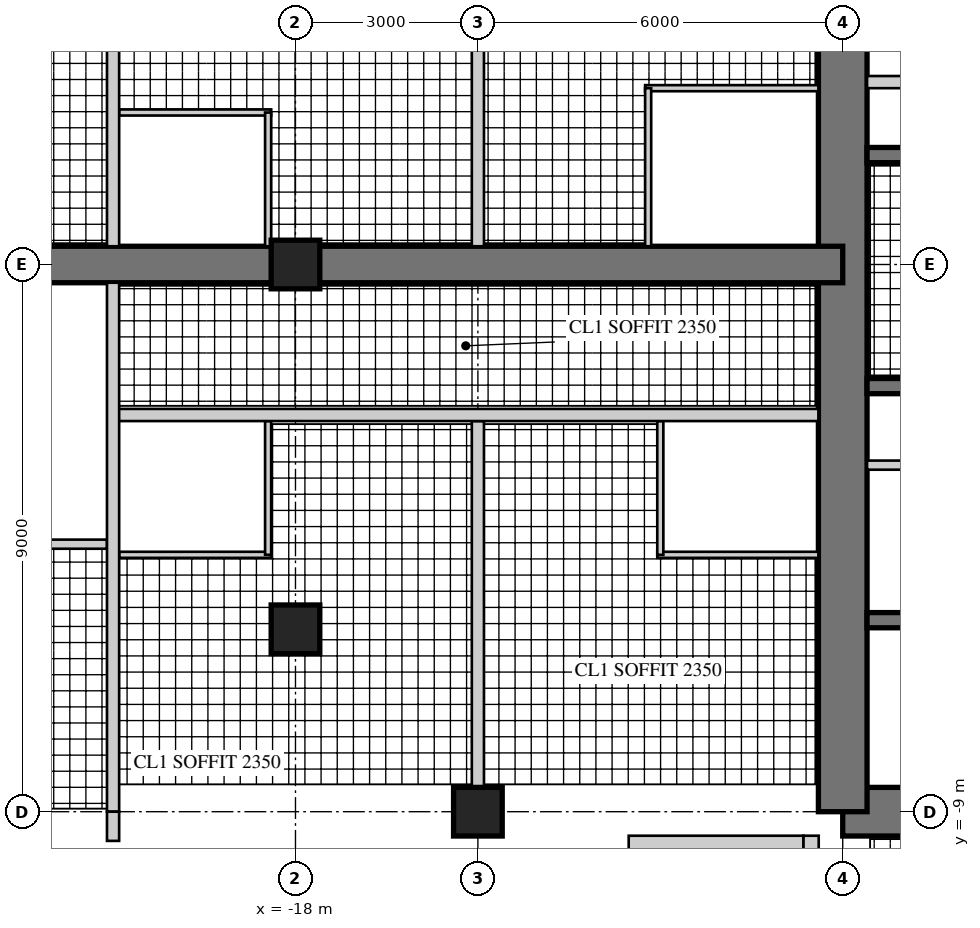
"""IFC4 building model, lengths in metres.
Left out: names, types, materials, properties, quantities, classifications, styles, units other than length and angle.
Written with IfcOpenShell. Run it as: python <this file> out.ifc"""

import sys

from ifc_helpers import new_model, si_unit, direction, frame, frame_2d, origin, origin_2d, place, context, subcontext, project, spatial, rectangle, hollow_rectangle, extrude, element, fill, save


model = new_model("IFC4")
c1 = context("Model", 3, precision=1e-05, world=origin(), true_north=direction((0.0, 1.0)))
c2 = subcontext(c1, "Body", "Model", "MODEL_VIEW")
j1 = project(units=[si_unit("LENGTHUNIT", "METRE"), si_unit("PLANEANGLEUNIT", "RADIAN")], contexts=[c1])
p1 = place(None, origin())
s1 = spatial("IfcSite", under=j1, at=p1, CompositionType="ELEMENT")
p2 = place(p1, origin())
s2 = spatial("IfcBuilding", under=s1, at=p2, CompositionType="ELEMENT")
p3 = place(p2, frame((0.0, 0.0, 225.5)))
s3 = spatial("IfcBuildingStorey", under=s2, at=p3, CompositionType="ELEMENT", Elevation=225.5)
p4 = place(p3, frame((-9.0, -9.0, 0.0), z_axis=(0.0, 0.0, 1.0), x_axis=(1.0, 0.0, 0.0)))
e1 = element("IfcWall", 1, at=p4, inside=s3, PredefinedType="SHEAR", context=c2, shape_type="SweptSolid", body=[
    extrude(rectangle(XDim=18.0, YDim=0.8, at=frame_2d((9.0, 0.0))), origin(), (0.0, 0.0, 1.0), 3.4),
])
p5 = place(p4, frame((9.8, 0.0, 0.0)))
e2 = element("IfcOpeningElement", 2, at=p5, cuts=e1, PredefinedType="OPENING", context=c2, shape_type="SweptSolid", body=[
    extrude(rectangle(XDim=1.0, YDim=2.4, at=frame_2d((0.5, 1.2))), frame((0.0, 0.41, 0.0), z_axis=(0.0, -1.0, 0.0), x_axis=(1.0, 0.0, 0.0)), (0.0, 0.0, 1.0), 0.82),
])
p6 = place(p3, frame((-9.0, 9.0, 0.0), z_axis=(0.0, 0.0, 1.0), x_axis=(0.0, -1.0, 0.0)))
e3 = element("IfcWall", 3, at=p6, inside=s3, PredefinedType="SHEAR", context=c2, shape_type="SweptSolid", body=[
    extrude(rectangle(XDim=18.0, YDim=0.8, at=frame_2d((9.0, 0.0))), origin(), (0.0, 0.0, 1.0), 3.4),
])
p7 = place(p6, frame((9.8, 0.0, 0.0)))
e4 = element("IfcOpeningElement", 4, at=p7, cuts=e3, PredefinedType="OPENING", context=c2, shape_type="SweptSolid", body=[
    extrude(rectangle(XDim=1.0, YDim=2.4, at=frame_2d((0.5, 1.2))), frame((0.0, 0.41, 0.0), z_axis=(0.0, -1.0, 0.0), x_axis=(1.0, 0.0, 0.0)), (0.0, 0.0, 1.0), 0.82),
])
p8 = place(p3, frame((-2.125, 1.8, 0.0), z_axis=(0.0, 0.0, 1.0), x_axis=(-1.0, 0.0, 0.0)))
e5 = element("IfcWall", 5, at=p8, inside=s3, PredefinedType="SHEAR", context=c2, shape_type="SweptSolid", body=[
    extrude(rectangle(XDim=6.475, YDim=0.25, at=frame_2d((3.238, 0.0))), origin(), (0.0, 0.0, 1.0), 3.4),
])
p9 = place(p3, frame((-5.725, 3.0, 0.0), z_axis=(0.0, 0.0, 1.0), x_axis=(-1.0, 0.0, 0.0)))
e6 = element("IfcWall", 6, at=p9, inside=s3, PredefinedType="PARTITIONING", context=c2, shape_type="SweptSolid", body=[
    extrude(rectangle(XDim=2.875, YDim=0.2, at=frame_2d((1.438, 0.0))), origin(), (0.0, 0.0, 1.0), 3.4),
])
p10 = place(p3, frame((-1.925, -2.0, 0.0), z_axis=(0.0, 0.0, 1.0), x_axis=(-1.0, 0.0, 0.0)))
e7 = element("IfcWall", 7, at=p10, inside=s3, PredefinedType="SHEAR", context=c2, shape_type="SweptSolid", body=[
    extrude(rectangle(XDim=6.675, YDim=0.25, at=frame_2d((3.337, 0.0))), origin(), (0.0, 0.0, 1.0), 3.4),
])
p11 = place(p3, frame((-1.925, -5.85, 0.0), z_axis=(0.0, 0.0, 1.0), x_axis=(-1.0, 0.0, 0.0)))
e8 = element("IfcWall", 8, at=p11, inside=s3, PredefinedType="SHEAR", context=c2, shape_type="SweptSolid", body=[
    extrude(rectangle(XDim=6.675, YDim=0.25, at=frame_2d((3.337, 0.0))), origin(), (0.0, 0.0, 1.0), 3.4),
])
p12 = place(p11, frame((0.496, 0.0, 0.0)))
e9 = element("IfcOpeningElement", 9, at=p12, cuts=e8, PredefinedType="OPENING", context=c2, shape_type="SweptSolid", body=[
    extrude(rectangle(XDim=1.1, YDim=2.2, at=frame_2d((0.55, 1.1))), frame((0.0, 0.135, 0.0), z_axis=(0.0, -1.0, 0.0), x_axis=(1.0, 0.0, 0.0)), (0.0, 0.0, 1.0), 0.27),
])
p13 = place(p11, frame((2.788, 0.0, 0.0)))
e10 = element("IfcOpeningElement", 10, at=p13, cuts=e8, PredefinedType="OPENING", context=c2, shape_type="SweptSolid", body=[
    extrude(rectangle(XDim=1.1, YDim=2.2, at=frame_2d((0.55, 1.1))), frame((0.0, 0.135, 0.0), z_axis=(0.0, -1.0, 0.0), x_axis=(1.0, 0.0, 0.0)), (0.0, 0.0, 1.0), 0.27),
])
p14 = place(p11, frame((5.079, 0.0, 0.0)))
e11 = element("IfcOpeningElement", 11, at=p14, cuts=e8, PredefinedType="OPENING", context=c2, shape_type="SweptSolid", body=[
    extrude(rectangle(XDim=1.1, YDim=2.2, at=frame_2d((0.55, 1.1))), frame((0.0, 0.135, 0.0), z_axis=(0.0, -1.0, 0.0), x_axis=(1.0, 0.0, 0.0)), (0.0, 0.0, 1.0), 0.27),
])
p15 = place(p3, frame((-1.925, -3.3, 0.0), z_axis=(0.0, 0.0, 1.0), x_axis=(-1.0, 0.0, 0.0)))
e12 = element("IfcWall", 12, at=p15, inside=s3, PredefinedType="PARTITIONING", context=c2, shape_type="SweptSolid", body=[
    extrude(rectangle(XDim=6.675, YDim=0.15, at=frame_2d((3.337, 0.0))), origin(), (0.0, 0.0, 1.0), 3.4),
])
p16 = place(p15, frame((0.075, 0.0, 0.0)))
e13 = element("IfcOpeningElement", 13, at=p16, cuts=e12, PredefinedType="OPENING", context=c2, shape_type="SweptSolid", body=[
    extrude(rectangle(XDim=0.8, YDim=2.1, at=frame_2d((0.4, 1.05))), frame((0.0, 0.085, 0.0), z_axis=(0.0, -1.0, 0.0), x_axis=(1.0, 0.0, 0.0)), (0.0, 0.0, 1.0), 0.17),
])
p17 = place(p15, frame((3.675, 0.0, 0.0)))
e14 = element("IfcOpeningElement", 14, at=p17, cuts=e12, PredefinedType="OPENING", context=c2, shape_type="SweptSolid", body=[
    extrude(rectangle(XDim=0.8, YDim=2.1, at=frame_2d((0.4, 1.05))), frame((0.0, 0.085, 0.0), z_axis=(0.0, -1.0, 0.0), x_axis=(1.0, 0.0, 0.0)), (0.0, 0.0, 1.0), 0.17),
])
p18 = place(p3, frame((-9.0, 0.0, 0.0), z_axis=(0.0, 0.0, 1.0), x_axis=(-1.0, 0.0, 0.0)))
e15 = element("IfcWall", 15, at=p18, inside=s3, PredefinedType="SHEAR", context=c2, shape_type="SweptSolid", body=[
    extrude(rectangle(XDim=18.0, YDim=0.6, at=frame_2d((9.0, 0.0))), origin(), (0.0, 0.0, 1.0), 3.4),
])
p19 = place(p18, frame((3.8, 0.0, 0.0)))
e16 = element("IfcOpeningElement", 16, at=p19, cuts=e15, PredefinedType="OPENING", context=c2, shape_type="SweptSolid", body=[
    extrude(rectangle(XDim=1.0, YDim=2.15, at=frame_2d((0.5, 1.075))), frame((0.0, 0.31, 0.0), z_axis=(0.0, -1.0, 0.0), x_axis=(1.0, 0.0, 0.0)), (0.0, 0.0, 1.0), 0.62),
])
p20 = place(p18, frame((6.6, 0.0, 0.0)))
e17 = element("IfcOpeningElement", 17, at=p20, cuts=e15, PredefinedType="OPENING", context=c2, shape_type="SweptSolid", body=[
    extrude(rectangle(XDim=1.0, YDim=2.15, at=frame_2d((0.5, 1.075))), frame((0.0, 0.31, 0.0), z_axis=(0.0, -1.0, 0.0), x_axis=(1.0, 0.0, 0.0)), (0.0, 0.0, 1.0), 0.62),
])
p21 = place(p18, frame((13.3, 0.0, 0.0)))
e18 = element("IfcOpeningElement", 18, at=p21, cuts=e15, PredefinedType="OPENING", context=c2, shape_type="SweptSolid", body=[
    extrude(rectangle(XDim=1.0, YDim=2.2, at=frame_2d((0.5, 1.1))), frame((0.0, 0.31, 0.0), z_axis=(0.0, -1.0, 0.0), x_axis=(1.0, 0.0, 0.0)), (0.0, 0.0, 1.0), 0.62),
])
for number, where, z_axis, x_axis in (
    (19, (-15.0, -9.0, 0.0), (0.0, 0.0, 1.0), (1.0, 0.0, 0.0)),
    (20, (-18.0, 0.0, 0.0), (0.0, 0.0, 1.0), (1.0, 0.0, 0.0)),
    (21, (-18.0, -6.0, 0.0), (0.0, 0.0, 1.0), (1.0, 0.0, 0.0)),
):
    element("IfcColumn", number, at=place(p3, frame(where, z_axis=z_axis, x_axis=x_axis)), inside=s3, PredefinedType="COLUMN", context=c2, shape_type="SweptSolid", body=[
        extrude(rectangle(XDim=0.8, YDim=0.8, at=origin_2d()), origin(), (0.0, 0.0, 1.0), 3.4),
    ])
p22 = place(p3, frame((-12.52, -9.52, 0.0), z_axis=(0.0, 0.0, 1.0), x_axis=(1.0, 0.0, 0.0)))
e22 = element("IfcWall", 22, at=p22, inside=s3, PredefinedType="SOLIDWALL", context=c2, shape_type="SweptSolid", body=[
    extrude(rectangle(XDim=2.875, YDim=0.25, at=frame_2d((1.438, 0.0))), origin(), (0.0, 0.0, 1.0), 3.22),
])
p23 = place(p22, frame((0.6, 0.0, 0.0)))
e23 = element("IfcOpeningElement", 23, at=p23, cuts=e22, PredefinedType="OPENING", context=c2, shape_type="SweptSolid", body=[
    extrude(rectangle(XDim=1.0, YDim=2.2, at=frame_2d((0.5, 1.1))), frame((0.0, 0.135, 0.0), z_axis=(0.0, -1.0, 0.0), x_axis=(1.0, 0.0, 0.0)), (0.0, 0.0, 1.0), 0.27),
])
p24 = place(p3, frame((-9.52, -9.395, 0.0), z_axis=(0.0, 0.0, 1.0), x_axis=(0.0, -1.0, 0.0)))
e24 = element("IfcWall", 24, at=p24, inside=s3, PredefinedType="SOLIDWALL", context=c2, shape_type="SweptSolid", body=[
    extrude(rectangle(XDim=3.125, YDim=0.25, at=frame_2d((1.562, 0.0))), origin(), (0.0, 0.0, 1.0), 3.22),
])
p25 = place(p24, frame((0.6, 0.0, 0.0)))
e25 = element("IfcOpeningElement", 25, at=p25, cuts=e24, PredefinedType="OPENING", context=c2, shape_type="SweptSolid", body=[
    extrude(rectangle(XDim=1.0, YDim=2.2, at=frame_2d((0.5, 1.1))), frame((0.0, 0.135, 0.0), z_axis=(0.0, -1.0, 0.0), x_axis=(1.0, 0.0, 0.0)), (0.0, 0.0, 1.0), 0.27),
])
p26 = place(p3, frame((-9.4, -4.775, 0.0), z_axis=(0.0, 0.0, 1.0), x_axis=(-1.0, 0.0, 0.0)))
e26 = element("IfcWall", 26, at=p26, inside=s3, PredefinedType="PARTITIONING", context=c2, shape_type="SweptSolid", body=[
    extrude(rectangle(XDim=2.65, YDim=0.1, at=frame_2d((1.325, 0.0))), origin(), (0.0, 0.0, 1.0), 3.22),
])
p27 = place(p3, frame((-12.0, -2.575, 0.0), z_axis=(0.0, 0.0, 1.0), x_axis=(0.0, -1.0, 0.0)))
e27 = element("IfcWall", 27, at=p27, inside=s3, PredefinedType="PARTITIONING", context=c2, shape_type="SweptSolid", body=[
    extrude(rectangle(XDim=2.2, YDim=0.1, at=frame_2d((1.1, 0.0))), origin(), (0.0, 0.0, 1.0), 3.22),
])
p28 = place(p27, frame((0.55, 0.0, 0.0)))
e28 = element("IfcOpeningElement", 28, at=p28, cuts=e27, PredefinedType="OPENING", context=c2, shape_type="SweptSolid", body=[
    extrude(rectangle(XDim=0.9, YDim=2.1, at=frame_2d((0.45, 1.05))), frame((0.0, 0.06, 0.0), z_axis=(0.0, -1.0, 0.0), x_axis=(1.0, 0.0, 0.0)), (0.0, 0.0, 1.0), 0.12),
])
p29 = place(p3, frame((-9.4, 2.9, 0.0), z_axis=(0.0, 0.0, 1.0), x_axis=(-1.0, 0.0, 0.0)))
e29 = element("IfcWall", 29, at=p29, inside=s3, PredefinedType="PARTITIONING", context=c2, shape_type="SweptSolid", body=[
    extrude(rectangle(XDim=2.85, YDim=0.1, at=frame_2d((1.425, 0.0))), origin(), (0.0, 0.0, 1.0), 3.22),
])
p30 = place(p3, frame((-12.2, 2.9, 0.0), z_axis=(0.0, 0.0, 1.0), x_axis=(0.0, -1.0, 0.0)))
e30 = element("IfcWall", 30, at=p30, inside=s3, PredefinedType="PARTITIONING", context=c2, shape_type="SweptSolid", body=[
    extrude(rectangle(XDim=2.6, YDim=0.1, at=frame_2d((1.3, 0.0))), origin(), (0.0, 0.0, 1.0), 3.22),
])
p31 = place(p30, frame((0.55, 0.0, 0.0)))
e31 = element("IfcOpeningElement", 31, at=p31, cuts=e30, PredefinedType="OPENING", context=c2, shape_type="SweptSolid", body=[
    extrude(rectangle(XDim=0.9, YDim=2.1, at=frame_2d((0.45, 1.05))), frame((0.0, 0.06, 0.0), z_axis=(0.0, -1.0, 0.0), x_axis=(1.0, 0.0, 0.0)), (0.0, 0.0, 1.0), 0.12),
])
p32 = place(p3, frame((-15.0, -2.575, 0.0), z_axis=(0.0, 0.0, 1.0), x_axis=(0.0, -1.0, 0.0)))
e32 = element("IfcWall", 32, at=p32, inside=s3, PredefinedType="SOLIDWALL", context=c2, shape_type="SweptSolid", body=[
    extrude(rectangle(XDim=6.025, YDim=0.2, at=frame_2d((3.013, 0.0))), origin(), (0.0, 0.0, 1.0), 2.52),
])
p33 = place(p3, frame((-15.0, 8.6, 0.0), z_axis=(0.0, 0.0, 1.0), x_axis=(0.0, -1.0, 0.0)))
e33 = element("IfcWall", 33, at=p33, inside=s3, PredefinedType="SOLIDWALL", context=c2, shape_type="SweptSolid", body=[
    extrude(rectangle(XDim=8.3, YDim=0.2, at=frame_2d((4.15, 0.0))), origin(), (0.0, 0.0, 1.0), 2.52),
])
p34 = place(p3, frame((-18.4, -4.775, 0.0), z_axis=(0.0, 0.0, 1.0), x_axis=(-1.0, 0.0, 0.0)))
e34 = element("IfcWall", 34, at=p34, inside=s3, PredefinedType="PARTITIONING", context=c2, shape_type="SweptSolid", body=[
    extrude(rectangle(XDim=2.5, YDim=0.1, at=frame_2d((1.25, 0.0))), origin(), (0.0, 0.0, 1.0), 3.22),
])
p35 = place(p3, frame((-18.45, -2.575, 0.0), z_axis=(0.0, 0.0, 1.0), x_axis=(0.0, -1.0, 0.0)))
e35 = element("IfcWall", 35, at=p35, inside=s3, PredefinedType="PARTITIONING", context=c2, shape_type="SweptSolid", body=[
    extrude(rectangle(XDim=2.2, YDim=0.1, at=frame_2d((1.1, 0.0))), origin(), (0.0, 0.0, 1.0), 3.22),
])
p36 = place(p35, frame((0.55, 0.0, 0.0)))
e36 = element("IfcOpeningElement", 36, at=p36, cuts=e35, PredefinedType="OPENING", context=c2, shape_type="SweptSolid", body=[
    extrude(rectangle(XDim=0.9, YDim=2.1, at=frame_2d((0.45, 1.05))), frame((0.0, 0.06, 0.0), z_axis=(0.0, -1.0, 0.0), x_axis=(1.0, 0.0, 0.0)), (0.0, 0.0, 1.0), 0.12),
])
p37 = place(p3, frame((-18.4, 2.5, 0.0), z_axis=(0.0, 0.0, 1.0), x_axis=(-1.0, 0.0, 0.0)))
e37 = element("IfcWall", 37, at=p37, inside=s3, PredefinedType="PARTITIONING", context=c2, shape_type="SweptSolid", body=[
    extrude(rectangle(XDim=2.5, YDim=0.1, at=frame_2d((1.25, 0.0))), origin(), (0.0, 0.0, 1.0), 3.22),
])
p38 = place(p3, frame((-18.45, 2.5, 0.0), z_axis=(0.0, 0.0, 1.0), x_axis=(0.0, -1.0, 0.0)))
e38 = element("IfcWall", 38, at=p38, inside=s3, PredefinedType="PARTITIONING", context=c2, shape_type="SweptSolid", body=[
    extrude(rectangle(XDim=2.2, YDim=0.1, at=frame_2d((1.1, 0.0))), origin(), (0.0, 0.0, 1.0), 3.22),
])
p39 = place(p38, frame((0.55, 0.0, 0.0)))
e39 = element("IfcOpeningElement", 39, at=p39, cuts=e38, PredefinedType="OPENING", context=c2, shape_type="SweptSolid", body=[
    extrude(rectangle(XDim=0.9, YDim=2.1, at=frame_2d((0.45, 1.05))), frame((0.0, 0.06, 0.0), z_axis=(0.0, -1.0, 0.0), x_axis=(1.0, 0.0, 0.0)), (0.0, 0.0, 1.0), 0.12),
])
p40 = place(p3, frame((-9.4, -2.475, 0.0), z_axis=(0.0, 0.0, 1.0), x_axis=(-1.0, 0.0, 0.0)))
e40 = element("IfcWall", 40, at=p40, inside=s3, PredefinedType="SOLIDWALL", context=c2, shape_type="SweptSolid", body=[
    extrude(rectangle(XDim=11.6, YDim=0.2, at=frame_2d((5.8, 0.0))), origin(), (0.0, 0.0, 1.0), 3.22),
])
p41 = place(p40, frame((3.4, 0.0, 0.0)))
e41 = element("IfcOpeningElement", 41, at=p41, cuts=e40, PredefinedType="OPENING", context=c2, shape_type="SweptSolid", body=[
    extrude(rectangle(XDim=1.0, YDim=2.15, at=frame_2d((0.5, 1.075))), frame((0.0, 0.11, 0.0), z_axis=(0.0, -1.0, 0.0), x_axis=(1.0, 0.0, 0.0)), (0.0, 0.0, 1.0), 0.22),
])
p42 = place(p40, frame((6.2, 0.0, 0.0)))
e42 = element("IfcOpeningElement", 42, at=p42, cuts=e40, PredefinedType="OPENING", context=c2, shape_type="SweptSolid", body=[
    extrude(rectangle(XDim=1.0, YDim=2.15, at=frame_2d((0.5, 1.075))), frame((0.0, 0.11, 0.0), z_axis=(0.0, -1.0, 0.0), x_axis=(1.0, 0.0, 0.0)), (0.0, 0.0, 1.0), 0.22),
])
p43 = place(p3, frame((-21.1, -4.6, 0.0), z_axis=(0.0, 0.0, 1.0), x_axis=(-1.0, 0.0, 0.0)))
e43 = element("IfcWall", 43, at=p43, inside=s3, PredefinedType="PARTITIONING", context=c2, shape_type="SweptSolid", body=[
    extrude(rectangle(XDim=5.6, YDim=0.15, at=frame_2d((2.8, 0.0))), origin(), (0.0, 0.0, 1.0), 3.22),
])
p44 = place(p43, frame((0.6, 0.0, 0.0)))
e44 = element("IfcOpeningElement", 44, at=p44, cuts=e43, PredefinedType="OPENING", context=c2, shape_type="SweptSolid", body=[
    extrude(rectangle(XDim=1.0, YDim=2.1, at=frame_2d((0.5, 1.05))), frame((0.0, 0.085, 0.0), z_axis=(0.0, -1.0, 0.0), x_axis=(1.0, 0.0, 0.0)), (0.0, 0.0, 1.0), 0.17),
])
p45 = place(p3, frame((-21.0, 9.0, 0.0), z_axis=(0.0, 0.0, 1.0), x_axis=(0.0, -1.0, 0.0)))
e45 = element("IfcWall", 45, at=p45, inside=s3, PredefinedType="SOLIDWALL", context=c2, shape_type="SweptSolid", body=[
    extrude(rectangle(XDim=8.7, YDim=0.2, at=frame_2d((4.35, 0.0))), origin(), (0.0, 0.0, 1.0), 2.67),
])
p46 = place(p3, frame((-21.0, -0.3, 0.0), z_axis=(0.0, 0.0, 1.0), x_axis=(0.0, -1.0, 0.0)))
e46 = element("IfcWall", 46, at=p46, inside=s3, PredefinedType="SOLIDWALL", context=c2, shape_type="SweptSolid", body=[
    extrude(rectangle(XDim=8.7, YDim=0.2, at=frame_2d((4.35, 0.0))), origin(), (0.0, 0.0, 1.0), 2.67),
])
p47 = place(p46, frame((0.45, 0.0, 0.0)))
e47 = element("IfcOpeningElement", 47, at=p47, cuts=e46, PredefinedType="OPENING", context=c2, shape_type="SweptSolid", body=[
    extrude(rectangle(XDim=1.0, YDim=2.2, at=frame_2d((0.5, 1.1))), frame((0.0, 0.11, 0.0), z_axis=(0.0, -1.0, 0.0), x_axis=(1.0, 0.0, 0.0)), (0.0, 0.0, 1.0), 0.22),
])
p48 = place(p3, frame((-21.0, -9.0, 0.0), z_axis=(0.0, 0.0, 1.0), x_axis=(0.0, -1.0, 0.0)))
e48 = element("IfcWall", 48, at=p48, inside=s3, PredefinedType="SOLIDWALL", context=c2, shape_type="SweptSolid", body=[
    extrude(rectangle(XDim=0.48, YDim=0.2, at=frame_2d((0.24, 0.0))), origin(), (0.0, 0.0, 1.0), 3.22),
])
p49 = place(p23, origin())
e49 = element("IfcDoor", 49, at=p49, inside=s3, OperationType="SINGLE_SWING_RIGHT", PredefinedType="DOOR", context=c2, shape_type="SweptSolid", body=[
    extrude(hollow_rectangle(XDim=1.0, YDim=2.2, WallThickness=0.06, at=frame_2d((0.5, 1.1))), frame((0.0, 0.025, 0.0), z_axis=(0.0, -1.0, 0.0), x_axis=(1.0, 0.0, 0.0)), (0.0, 0.0, 1.0), 0.05),
    extrude(rectangle(XDim=0.879, YDim=2.079, at=frame_2d((0.5, 1.1))), frame((0.0, 0.025, 0.0), z_axis=(0.0, -1.0, 0.0), x_axis=(1.0, 0.0, 0.0)), (0.0, 0.0, 1.0), 0.05),
])
fill(e23, e49)
p50 = place(p28, origin())
e50 = element("IfcDoor", 50, at=p50, inside=s3, OperationType="SINGLE_SWING_LEFT", PredefinedType="DOOR", context=c2, shape_type="SweptSolid", body=[
    extrude(rectangle(XDim=0.9, YDim=2.1, at=frame_2d((0.45, 1.05))), frame((0.0, 0.025, 0.0), z_axis=(0.0, -1.0, 0.0), x_axis=(1.0, 0.0, 0.0)), (0.0, 0.0, 1.0), 0.05),
])
fill(e28, e50)
p51 = place(p31, origin())
e51 = element("IfcDoor", 51, at=p51, inside=s3, OperationType="SINGLE_SWING_LEFT", PredefinedType="DOOR", context=c2, shape_type="SweptSolid", body=[
    extrude(rectangle(XDim=0.9, YDim=2.1, at=frame_2d((0.45, 1.05))), frame((0.0, 0.025, 0.0), z_axis=(0.0, -1.0, 0.0), x_axis=(1.0, 0.0, 0.0)), (0.0, 0.0, 1.0), 0.05),
])
fill(e31, e51)
p52 = place(p36, frame((0.9, 0.0, 0.0), z_axis=(0.0, 0.0, 1.0), x_axis=(-1.0, 0.0, 0.0)))
e52 = element("IfcDoor", 52, at=p52, inside=s3, OperationType="SINGLE_SWING_RIGHT", PredefinedType="DOOR", context=c2, shape_type="SweptSolid", body=[
    extrude(rectangle(XDim=0.9, YDim=2.1, at=frame_2d((0.45, 1.05))), frame((0.0, 0.025, 0.0), z_axis=(0.0, -1.0, 0.0), x_axis=(1.0, 0.0, 0.0)), (0.0, 0.0, 1.0), 0.05),
])
fill(e36, e52)
p53 = place(p39, frame((0.9, 0.0, 0.0), z_axis=(0.0, 0.0, 1.0), x_axis=(-1.0, 0.0, 0.0)))
e53 = element("IfcDoor", 53, at=p53, inside=s3, OperationType="SINGLE_SWING_RIGHT", PredefinedType="DOOR", context=c2, shape_type="SweptSolid", body=[
    extrude(rectangle(XDim=0.9, YDim=2.1, at=frame_2d((0.45, 1.05))), frame((0.0, 0.025, 0.0), z_axis=(0.0, -1.0, 0.0), x_axis=(1.0, 0.0, 0.0)), (0.0, 0.0, 1.0), 0.05),
])
fill(e39, e53)
p54 = place(p41, origin())
e54 = element("IfcDoor", 54, at=p54, inside=s3, OperationType="SINGLE_SWING_LEFT", PredefinedType="DOOR", context=c2, shape_type="SweptSolid", body=[
    extrude(rectangle(XDim=1.0, YDim=2.15, at=frame_2d((0.5, 1.075))), frame((0.0, 0.025, 0.0), z_axis=(0.0, -1.0, 0.0), x_axis=(1.0, 0.0, 0.0)), (0.0, 0.0, 1.0), 0.05),
])
fill(e41, e54)
p55 = place(p42, origin())
e55 = element("IfcDoor", 55, at=p55, inside=s3, OperationType="SINGLE_SWING_LEFT", PredefinedType="DOOR", context=c2, shape_type="SweptSolid", body=[
    extrude(rectangle(XDim=1.0, YDim=2.15, at=frame_2d((0.5, 1.075))), frame((0.0, 0.025, 0.0), z_axis=(0.0, -1.0, 0.0), x_axis=(1.0, 0.0, 0.0)), (0.0, 0.0, 1.0), 0.05),
])
fill(e42, e55)
p56 = place(p44, origin())
e56 = element("IfcDoor", 56, at=p56, inside=s3, OperationType="SINGLE_SWING_LEFT", PredefinedType="DOOR", context=c2, shape_type="SweptSolid", body=[
    extrude(rectangle(XDim=1.0, YDim=2.1, at=frame_2d((0.5, 1.05))), frame((0.0, 0.025, 0.0), z_axis=(0.0, -1.0, 0.0), x_axis=(1.0, 0.0, 0.0)), (0.0, 0.0, 1.0), 0.05),
])
fill(e44, e56)
p57 = place(p47, frame((1.0, 0.0, 0.0), z_axis=(0.0, 0.0, 1.0), x_axis=(-1.0, 0.0, 0.0)))
e57 = element("IfcDoor", 57, at=p57, inside=s3, OperationType="SINGLE_SWING_RIGHT", PredefinedType="DOOR", context=c2, shape_type="SweptSolid", body=[
    extrude(rectangle(XDim=1.0, YDim=2.2, at=frame_2d((0.5, 1.1))), frame((0.0, 0.025, 0.0), z_axis=(0.0, -1.0, 0.0), x_axis=(1.0, 0.0, 0.0)), (0.0, 0.0, 1.0), 0.05),
])
fill(e47, e57)
p58 = place(p19, frame((1.0, 0.0, 0.0), z_axis=(0.0, 0.0, 1.0), x_axis=(-1.0, 0.0, 0.0)))
e58 = element("IfcDoor", 58, at=p58, inside=s3, OperationType="SINGLE_SWING_RIGHT", PredefinedType="DOOR", context=c2, shape_type="SweptSolid", body=[
    extrude(rectangle(XDim=1.0, YDim=2.15, at=frame_2d((0.5, 1.075))), frame((0.0, 0.025, 0.0), z_axis=(0.0, -1.0, 0.0), x_axis=(1.0, 0.0, 0.0)), (0.0, 0.0, 1.0), 0.05),
])
fill(e16, e58)
p59 = place(p20, frame((1.0, 0.0, 0.0), z_axis=(0.0, 0.0, 1.0), x_axis=(-1.0, 0.0, 0.0)))
e59 = element("IfcDoor", 59, at=p59, inside=s3, OperationType="SINGLE_SWING_RIGHT", PredefinedType="DOOR", context=c2, shape_type="SweptSolid", body=[
    extrude(rectangle(XDim=1.0, YDim=2.15, at=frame_2d((0.5, 1.075))), frame((0.0, 0.025, 0.0), z_axis=(0.0, -1.0, 0.0), x_axis=(1.0, 0.0, 0.0)), (0.0, 0.0, 1.0), 0.05),
])
fill(e17, e59)
p60 = place(p7, origin())
e60 = element("IfcDoor", 60, at=p60, inside=s3, OperationType="SINGLE_SWING_RIGHT", PredefinedType="DOOR", context=c2, shape_type="SweptSolid", body=[
    extrude(rectangle(XDim=1.0, YDim=2.4, at=frame_2d((0.5, 1.2))), frame((0.0, 0.055, 0.0), z_axis=(0.0, -1.0, 0.0), x_axis=(1.0, 0.0, 0.0)), (0.0, 0.0, 1.0), 0.05),
])
fill(e4, e60)
p61 = place(p14, origin())
e61 = element("IfcDoor", 61, at=p61, inside=s3, OperationType="DOUBLE_DOOR_SLIDING", PredefinedType="DOOR", context=c2, shape_type="SweptSolid", body=[
    extrude(rectangle(XDim=1.1, YDim=2.2, at=frame_2d((0.55, 1.1))), frame((0.0, 0.025, 0.0), z_axis=(0.0, -1.0, 0.0), x_axis=(1.0, 0.0, 0.0)), (0.0, 0.0, 1.0), 0.05),
])
fill(e11, e61)
save(model, sys.argv[1])
